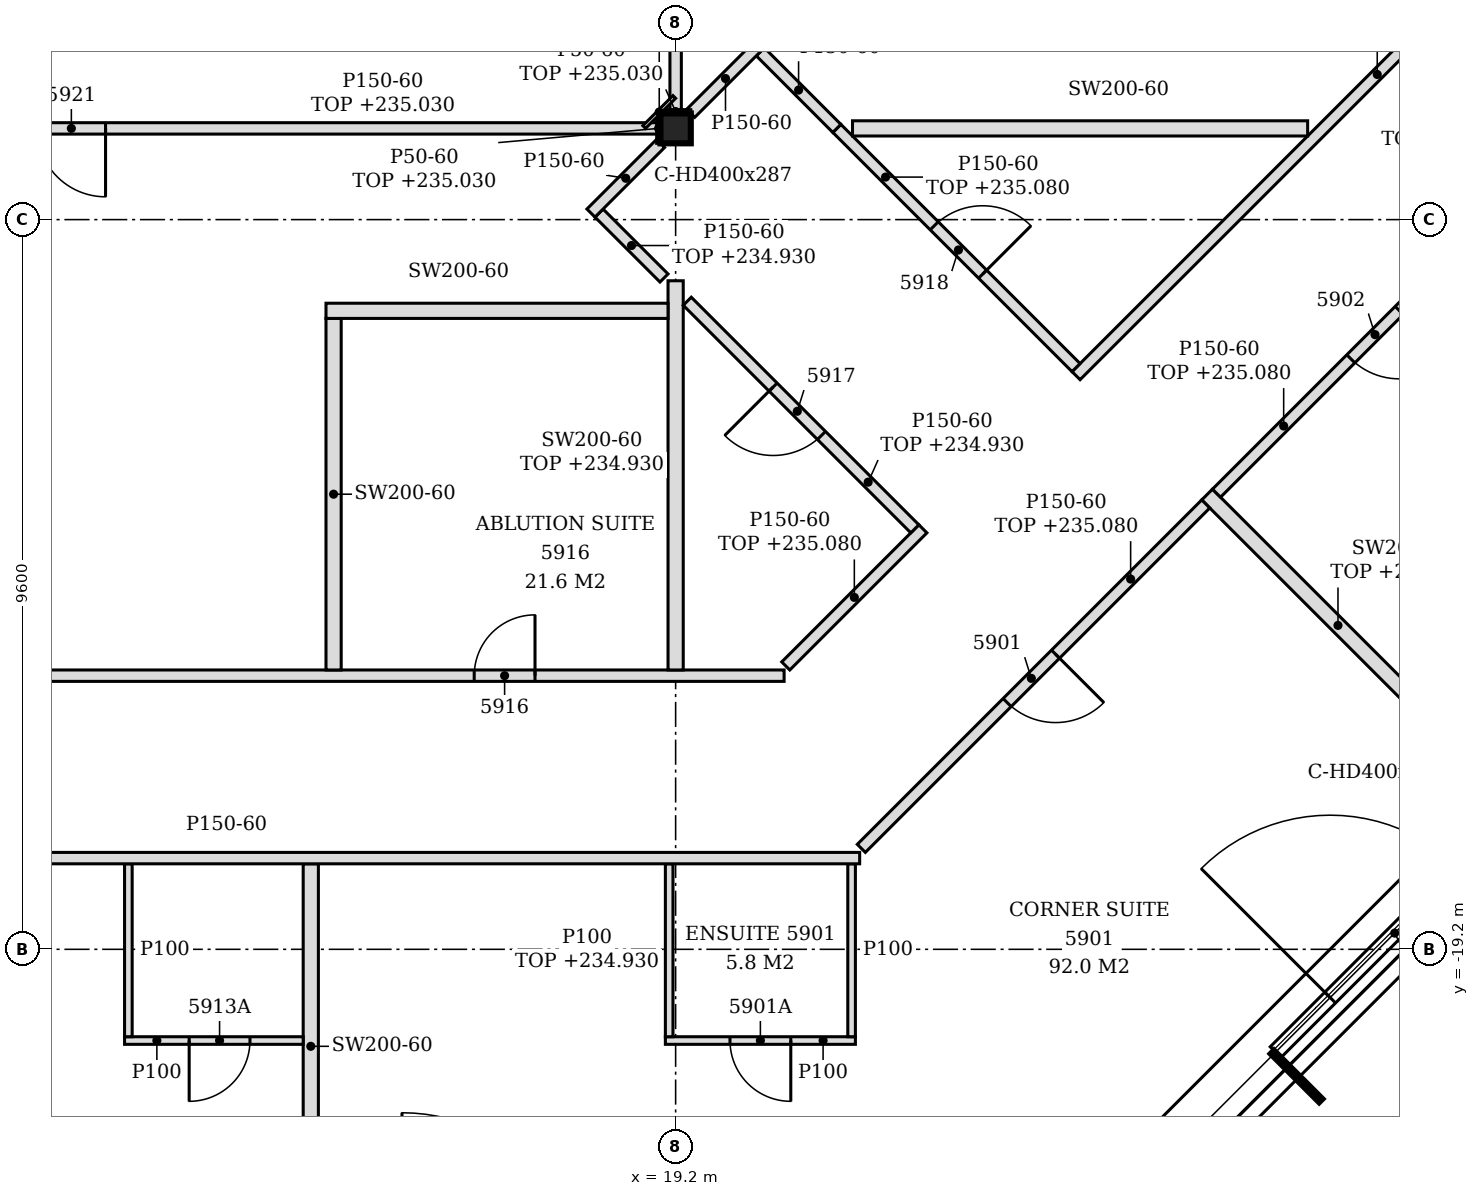
"""IFC4 building model, lengths in metres.
Left out: names, types, materials, properties, quantities, classifications, styles, units other than length and angle.
Written with IfcOpenShell. Run it as: python <this file> out.ifc"""

import sys

from ifc_helpers import new_model, si_unit, direction, frame, frame_2d, origin, origin_2d, place, context, subcontext, project, spatial, polyline, rectangle, i_section, outline, extrude, element, fill, save


model = new_model("IFC4")
c1 = context("Model", 3, precision=1e-05, world=origin(), true_north=direction((0.0, 1.0)))
c2 = subcontext(c1, "Body", "Model", "MODEL_VIEW")
j1 = project(units=[si_unit("LENGTHUNIT", "METRE"), si_unit("PLANEANGLEUNIT", "RADIAN")], contexts=[c1])
p1 = place(None, origin())
s1 = spatial("IfcSite", under=j1, at=p1, CompositionType="ELEMENT")
p2 = place(p1, origin())
s2 = spatial("IfcBuilding", under=s1, at=p2, CompositionType="ELEMENT")
p3 = place(p2, frame((0.0, 0.0, 232.2)))
s3 = spatial("IfcBuildingStorey", under=s2, at=p3, CompositionType="ELEMENT", Elevation=232.2)
p4 = place(p3, frame((19.2, -8.4, -0.15), z_axis=(0.0, 0.0, 1.0), x_axis=(1.0, 0.0, 0.0)))
e1 = element("IfcColumn", 1, at=p4, inside=s3, PredefinedType="COLUMN", context=c2, shape_type="SweptSolid", body=[
    extrude(i_section(OverallWidth=0.399, OverallDepth=0.393, WebThickness=0.023, FlangeThickness=0.037, FilletRadius=0.015, at=origin_2d()), origin(), (0.0, 0.0, 1.0), 3.6),
])
p5 = place(p3, frame((27.093, -20.553, 0.0), z_axis=(0.0, 0.0, 1.0), x_axis=(0.707079231393, 0.707134329907, 0.0)))
e2 = element("IfcWall", 2, at=p5, inside=s3, PredefinedType="NOTDEFINED", context=c2, shape_type="SweptSolid", body=[
    extrude(rectangle(XDim=4.431, YDim=0.2, at=frame_2d((2.215, 0.0))), origin(), (0.0, 0.0, 1.0), 3.45),
])
p6 = place(p5, frame((1.015, 0.0, 0.0)))
e3 = element("IfcOpeningElement", 3, at=p6, cuts=e2, PredefinedType="OPENING", context=c2, shape_type="SweptSolid", body=[
    extrude(rectangle(XDim=2.4, YDim=2.4, at=frame_2d((1.2, 1.2))), frame((0.0, 0.11, 0.0), z_axis=(0.0, -1.0, 0.0), x_axis=(1.0, 0.0, 0.0)), (0.0, 0.0, 1.0), 0.22),
])
p7 = place(p3, frame((14.4, -22.877, 0.0), z_axis=(0.0, 0.0, 1.0), x_axis=(0.0, 1.0, 0.0)))
e4 = element("IfcWall", 4, at=p7, inside=s3, PredefinedType="PARTITIONING", context=c2, shape_type="SweptSolid", body=[
    extrude(outline(polyline([(0.0, 0.0), (4.802, 0.0), (4.802, 3.45), (3.782, 3.45), (3.78, 2.88), (3.572, 2.88), (3.57, 3.45), (0.0, 3.45), (0.0, 0.0)])), frame((0.0, 0.1, 0.0), z_axis=(0.0, -1.0, 0.0), x_axis=(1.0, 0.0, 0.0)), (0.0, 0.0, 1.0), 0.2),
])
p8 = place(p3, frame((11.95, -20.4, 0.0), z_axis=(0.0, 0.0, 1.0), x_axis=(1.0, 0.0, 0.0)))
e5 = element("IfcWall", 5, at=p8, inside=s3, PredefinedType="PARTITIONING", context=c2, shape_type="SweptSolid", body=[
    extrude(rectangle(XDim=2.35, YDim=0.1, at=frame_2d((1.175, 0.0))), origin(), (0.0, 0.0, 1.0), 3.45),
])
p9 = place(p8, frame((0.85, 0.0, 0.0)))
e6 = element("IfcOpeningElement", 6, at=p9, cuts=e5, PredefinedType="OPENING", context=c2, shape_type="SweptSolid", body=[
    extrude(rectangle(XDim=0.8, YDim=2.1, at=frame_2d((0.4, 1.05))), frame((0.0, 0.06, 0.0), z_axis=(0.0, -1.0, 0.0), x_axis=(1.0, 0.0, 0.0)), (0.0, 0.0, 1.0), 0.12),
])
p10 = place(p3, frame((12.0, -20.35, 0.0), z_axis=(0.0, 0.0, 1.0), x_axis=(0.0, 1.0, 0.0)))
e7 = element("IfcWall", 7, at=p10, inside=s3, PredefinedType="PARTITIONING", context=c2, shape_type="SweptSolid", body=[
    extrude(outline(polyline([(0.0, 0.0), (2.275, 0.0), (2.275, 3.45), (1.255, 3.45), (1.253, 2.88), (1.045, 2.88), (1.043, 3.45), (0.0, 3.45), (0.0, 0.0)])), frame((0.0, 0.05, 0.0), z_axis=(0.0, -1.0, 0.0), x_axis=(1.0, 0.0, 0.0)), (0.0, 0.0, 1.0), 0.1),
])
p11 = place(p3, frame((19.065, -20.4, 0.0), z_axis=(0.0, 0.0, 1.0), x_axis=(1.0, 0.0, 0.0)))
e8 = element("IfcWall", 8, at=p11, inside=s3, PredefinedType="PARTITIONING", context=c2, shape_type="SweptSolid", body=[
    extrude(outline(polyline([(0.0, 0.0), (2.5, 0.0), (2.5, 3.45), (0.285, 3.45), (0.283, 2.73), (0.0, 2.73), (0.0, 0.0)])), frame((0.0, 0.05, 0.0), z_axis=(0.0, -1.0, 0.0), x_axis=(1.0, 0.0, 0.0)), (0.0, 0.0, 1.0), 0.1),
])
p12 = place(p11, frame((0.85, 0.0, 0.0)))
e9 = element("IfcOpeningElement", 9, at=p12, cuts=e8, PredefinedType="OPENING", context=c2, shape_type="SweptSolid", body=[
    extrude(rectangle(XDim=0.8, YDim=2.1, at=frame_2d((0.4, 1.05))), frame((0.0, 0.06, 0.0), z_axis=(0.0, -1.0, 0.0), x_axis=(1.0, 0.0, 0.0)), (0.0, 0.0, 1.0), 0.12),
])
p13 = place(p3, frame((19.115, -20.35, 0.0), z_axis=(0.0, 0.0, 1.0), x_axis=(0.0, 1.0, 0.0)))
e10 = element("IfcWall", 10, at=p13, inside=s3, PredefinedType="PARTITIONING", context=c2, shape_type="SweptSolid", body=[
    extrude(rectangle(XDim=2.275, YDim=0.1, at=frame_2d((1.138, 0.0))), origin(), (0.0, 0.0, 1.0), 2.73),
])
p14 = place(p3, frame((21.515, -20.35, 0.0), z_axis=(0.0, 0.0, 1.0), x_axis=(0.0, 1.0, 0.0)))
e11 = element("IfcWall", 11, at=p14, inside=s3, PredefinedType="PARTITIONING", context=c2, shape_type="SweptSolid", body=[
    extrude(outline(polyline([(0.0, 0.0), (2.275, 0.0), (2.275, 3.45), (1.245, 3.45), (1.243, 2.98), (1.055, 2.98), (1.053, 3.45), (0.0, 3.45), (0.0, 0.0)])), frame((0.0, 0.05, 0.0), z_axis=(0.0, -1.0, 0.0), x_axis=(1.0, 0.0, 0.0)), (0.0, 0.0, 1.0), 0.1),
])
p15 = place(p3, frame((-0.726, -18.0, 0.0), z_axis=(0.0, 0.0, 1.0), x_axis=(1.0, 0.0, 0.0)))
e12 = element("IfcWall", 12, at=p15, inside=s3, PredefinedType="PARTITIONING", context=c2, shape_type="SweptSolid", body=[
    extrude(outline(polyline([(0.0, 0.0), (22.347, 0.0), (22.347, 3.45), (20.076, 3.45), (20.074, 2.73), (19.776, 2.73), (19.774, 3.45), (8.076, 3.45), (8.074, 2.73), (7.776, 2.73), (7.774, 3.45), (1.086, 3.45), (1.084, 2.93), (0.512, 2.93), (0.51, 3.45), (0.0, 3.45), (0.0, 0.0)])), frame((0.0, 0.075, 0.0), z_axis=(0.0, -1.0, 0.0), x_axis=(1.0, 0.0, 0.0)), (0.0, 0.0, 1.0), 0.15),
])
p16 = place(p15, frame((5.676, 0.0, 0.0)))
e13 = element("IfcOpeningElement", 13, at=p16, cuts=e12, PredefinedType="OPENING", context=c2, shape_type="SweptSolid", body=[
    extrude(rectangle(XDim=0.9, YDim=2.1, at=frame_2d((0.45, 1.05))), frame((0.0, 0.085, 0.0), z_axis=(0.0, -1.0, 0.0), x_axis=(1.0, 0.0, 0.0)), (0.0, 0.0, 1.0), 0.17),
])
p17 = place(p3, frame((21.643, -17.872, 0.0), z_axis=(0.0, 0.0, 1.0), x_axis=(0.707106781187, 0.707106781187, 0.0)))
e14 = element("IfcWall", 14, at=p17, inside=s3, PredefinedType="PARTITIONING", context=c2, shape_type="SweptSolid", body=[
    extrude(rectangle(XDim=6.408, YDim=0.15, at=frame_2d((3.204, 0.0))), origin(), (0.0, 0.0, 1.0), 2.88),
])
p18 = place(p17, frame((2.713, 0.0, 0.0)))
e15 = element("IfcOpeningElement", 15, at=p18, cuts=e14, PredefinedType="OPENING", context=c2, shape_type="SweptSolid", body=[
    extrude(rectangle(XDim=0.9, YDim=2.1, at=frame_2d((0.45, 1.05))), frame((0.0, 0.085, 0.0), z_axis=(0.0, -1.0, 0.0), x_axis=(1.0, 0.0, 0.0)), (0.0, 0.0, 1.0), 0.17),
])
p19 = place(p3, frame((29.636, -16.66, 0.0), z_axis=(0.0, 0.0, 1.0), x_axis=(-0.707207037357, 0.707006510799, 0.0)))
e16 = element("IfcWall", 16, at=p19, inside=s3, PredefinedType="PARTITIONING", context=c2, shape_type="SweptSolid", body=[
    extrude(rectangle(XDim=4.87, YDim=0.2, at=frame_2d((2.435, 0.0))), origin(), (0.0, 0.0, 1.0), 2.88),
])
p20 = place(p3, frame((-0.312, -15.6, 0.0), z_axis=(0.0, 0.0, 1.0), x_axis=(1.0, 0.0, 0.0)))
e17 = element("IfcWall", 17, at=p20, inside=s3, PredefinedType="PARTITIONING", context=c2, shape_type="SweptSolid", body=[
    extrude(outline(polyline([(0.0, 0.0), (20.939, 0.0), (20.939, 3.45), (19.662, 3.45), (19.66, 2.73), (19.362, 2.73), (19.36, 3.45), (7.662, 3.45), (7.66, 2.73), (7.362, 2.73), (7.36, 3.45), (0.0, 3.45), (0.0, 0.0)])), frame((0.0, 0.075, 0.0), z_axis=(0.0, -1.0, 0.0), x_axis=(1.0, 0.0, 0.0)), (0.0, 0.0, 1.0), 0.15),
])
p21 = place(p20, frame((16.862, 0.0, 0.0)))
e18 = element("IfcOpeningElement", 18, at=p21, cuts=e17, PredefinedType="OPENING", context=c2, shape_type="SweptSolid", body=[
    extrude(rectangle(XDim=0.8, YDim=2.1, at=frame_2d((0.4, 1.05))), frame((0.0, 0.085, 0.0), z_axis=(0.0, -1.0, 0.0), x_axis=(1.0, 0.0, 0.0)), (0.0, 0.0, 1.0), 0.17),
])
p22 = place(p3, frame((14.7, -15.525, 0.0), z_axis=(0.0, 0.0, 1.0), x_axis=(0.0, 1.0, 0.0)))
e19 = element("IfcWall", 19, at=p22, inside=s3, PredefinedType="PARTITIONING", context=c2, shape_type="SweptSolid", body=[
    extrude(outline(polyline([(0.0, 0.0), (4.625, 0.0), (4.625, 3.45), (1.23, 3.45), (1.228, 2.88), (1.02, 2.88), (1.018, 3.45), (0.0, 3.45), (0.0, 0.0)])), frame((0.0, 0.1, 0.0), z_axis=(0.0, -1.0, 0.0), x_axis=(1.0, 0.0, 0.0)), (0.0, 0.0, 1.0), 0.2),
])
p23 = place(p3, frame((19.2, -15.525, 0.0), z_axis=(0.0, 0.0, 1.0), x_axis=(0.0, 1.0, 0.0)))
e20 = element("IfcWall", 20, at=p23, inside=s3, PredefinedType="PARTITIONING", context=c2, shape_type="SweptSolid", body=[
    extrude(rectangle(XDim=5.12, YDim=0.2, at=frame_2d((2.56, 0.0))), origin(), (0.0, 0.0, 1.0), 2.73),
])
p24 = place(p3, frame((20.649, -15.472, 0.0), z_axis=(0.0, 0.0, 1.0), x_axis=(0.707106781187, 0.707106781187, 0.0)))
e21 = element("IfcWall", 21, at=p24, inside=s3, PredefinedType="PARTITIONING", context=c2, shape_type="SweptSolid", body=[
    extrude(rectangle(XDim=2.551, YDim=0.15, at=frame_2d((1.276, 0.0))), origin(), (0.0, 0.0, 1.0), 2.88),
])
p25 = place(p3, frame((22.347, -13.668, 0.0), z_axis=(0.0, 0.0, 1.0), x_axis=(-0.707106781187, 0.707106781187, 0.0)))
e22 = element("IfcWall", 22, at=p25, inside=s3, PredefinedType="PARTITIONING", context=c2, shape_type="SweptSolid", body=[
    extrude(rectangle(XDim=4.234, YDim=0.15, at=frame_2d((2.117, 0.0))), origin(), (0.0, 0.0, 1.0), 2.73),
])
p26 = place(p25, frame((1.737, 0.0, 0.0)))
e23 = element("IfcOpeningElement", 23, at=p26, cuts=e22, PredefinedType="OPENING", context=c2, shape_type="SweptSolid", body=[
    extrude(rectangle(XDim=0.9, YDim=2.1, at=frame_2d((0.45, 1.05))), frame((0.0, 0.085, 0.0), z_axis=(0.0, -1.0, 0.0), x_axis=(1.0, 0.0, 0.0)), (0.0, 0.0, 1.0), 0.17),
])
p27 = place(p3, frame((26.316, -13.199, 0.0), z_axis=(0.0, 0.0, 1.0), x_axis=(0.707024001185, 0.707189551498, 0.0)))
e24 = element("IfcWall", 24, at=p27, inside=s3, PredefinedType="PARTITIONING", context=c2, shape_type="SweptSolid", body=[
    extrude(rectangle(XDim=5.899, YDim=0.15, at=frame_2d((2.949, 0.0))), origin(), (0.0, 0.0, 1.0), 2.88),
])
p28 = place(p27, frame((2.5, 0.0, 0.0)))
e25 = element("IfcOpeningElement", 25, at=p28, cuts=e24, PredefinedType="OPENING", context=c2, shape_type="SweptSolid", body=[
    extrude(rectangle(XDim=0.9, YDim=2.1, at=frame_2d((0.45, 1.05))), frame((0.0, 0.085, 0.0), z_axis=(0.0, -1.0, 0.0), x_axis=(1.0, 0.0, 0.0)), (0.0, 0.0, 1.0), 0.17),
])
p29 = place(p3, frame((24.468, -11.653, 0.0), z_axis=(0.0, 0.0, 1.0), x_axis=(0.707095889299, 0.707117672906, 0.0)))
e26 = element("IfcWall", 26, at=p29, inside=s3, PredefinedType="PARTITIONING", context=c2, shape_type="SweptSolid", body=[
    extrude(rectangle(XDim=11.208, YDim=0.15, at=frame_2d((5.604, 0.0))), origin(), (0.0, 0.0, 1.0), 2.88),
])
p30 = place(p3, frame((24.468, -11.547, 0.0), z_axis=(0.0, 0.0, 1.0), x_axis=(-0.707079353217, 0.707134208093, 0.0)))
e27 = element("IfcWall", 27, at=p30, inside=s3, PredefinedType="PARTITIONING", context=c2, shape_type="SweptSolid", body=[
    extrude(rectangle(XDim=4.451, YDim=0.15, at=frame_2d((2.225, 0.0))), origin(), (0.0, 0.0, 1.0), 2.88),
])
p31 = place(p30, frame((1.739, 0.0, 0.0)))
e28 = element("IfcOpeningElement", 28, at=p31, cuts=e27, PredefinedType="OPENING", context=c2, shape_type="SweptSolid", body=[
    extrude(rectangle(XDim=0.9, YDim=2.1, at=frame_2d((0.45, 1.05))), frame((0.0, 0.085, 0.0), z_axis=(0.0, -1.0, 0.0), x_axis=(1.0, 0.0, 0.0)), (0.0, 0.0, 1.0), 0.17),
])
p32 = place(p3, frame((14.6, -10.8, 0.0), z_axis=(0.0, 0.0, 1.0), x_axis=(1.0, 0.0, 0.0)))
e29 = element("IfcWall", 29, at=p32, inside=s3, PredefinedType="PARTITIONING", context=c2, shape_type="SweptSolid", body=[
    extrude(outline(polyline([(0.0, 0.0), (4.5, 0.0), (4.5, 2.73), (4.45, 2.73), (4.448, 3.45), (0.0, 3.45), (0.0, 0.0)])), frame((0.0, 0.1, 0.0), z_axis=(0.0, -1.0, 0.0), x_axis=(1.0, 0.0, 0.0)), (0.0, 0.0, 1.0), 0.2),
])
p33 = place(p3, frame((19.047, -10.368, 0.0), z_axis=(0.0, 0.0, 1.0), x_axis=(-0.707409718716, 0.706803713817, 0.0)))
e30 = element("IfcWall", 30, at=p33, inside=s3, PredefinedType="PARTITIONING", context=c2, shape_type="SweptSolid", body=[
    extrude(rectangle(XDim=1.208, YDim=0.15, at=frame_2d((0.604, 0.0))), origin(), (0.0, 0.0, 1.0), 2.73),
])
p34 = place(p3, frame((18.086, -9.514, 0.0), z_axis=(0.0, 0.0, 1.0), x_axis=(0.707106781187, 0.707106781187, 0.0)))
e31 = element("IfcWall", 31, at=p34, inside=s3, PredefinedType="PARTITIONING", context=c2, shape_type="SweptSolid", body=[
    extrude(rectangle(XDim=1.295, YDim=0.15, at=frame_2d((0.648, 0.0))), origin(), (0.0, 0.0, 1.0), 3.45),
])
p35 = place(p3, frame((7.399, -8.4, 0.0), z_axis=(0.0, 0.0, 1.0), x_axis=(1.0, 0.0, 0.0)))
e32 = element("IfcWall", 32, at=p35, inside=s3, PredefinedType="PARTITIONING", context=c2, shape_type="SweptSolid", body=[
    extrude(rectangle(XDim=11.601, YDim=0.15, at=frame_2d((5.801, 0.0))), origin(), (0.0, 0.0, 1.0), 2.83),
])
p36 = place(p35, frame((3.4, 0.0, 0.0)))
e33 = element("IfcOpeningElement", 33, at=p36, cuts=e32, PredefinedType="OPENING", context=c2, shape_type="SweptSolid", body=[
    extrude(rectangle(XDim=0.9, YDim=2.1, at=frame_2d((0.45, 1.05))), frame((0.0, 0.085, 0.0), z_axis=(0.0, -1.0, 0.0), x_axis=(1.0, 0.0, 0.0)), (0.0, 0.0, 1.0), 0.17),
])
p37 = place(p3, frame((21.321, -8.4, 0.0), z_axis=(0.0, 0.0, 1.0), x_axis=(-0.706763941595, 0.707449454633, 0.0)))
e34 = element("IfcWall", 34, at=p37, inside=s3, PredefinedType="PARTITIONING", context=c2, shape_type="SweptSolid", body=[
    extrude(rectangle(XDim=1.425, YDim=0.15, at=frame_2d((0.712, 0.0))), origin(), (0.0, 0.0, 1.0), 3.45),
])
p38 = place(p3, frame((21.527, -8.4, 0.0), z_axis=(0.0, 0.0, 1.0), x_axis=(1.0, 0.0, 0.0)))
e35 = element("IfcWall", 35, at=p38, inside=s3, PredefinedType="PARTITIONING", context=c2, shape_type="SweptSolid", body=[
    extrude(rectangle(XDim=5.988, YDim=0.2, at=frame_2d((2.994, 0.0))), origin(), (0.0, 0.0, 1.0), 3.45),
])
p39 = place(p3, frame((19.2, -8.204, 0.0), z_axis=(0.0, 0.0, 1.0), x_axis=(0.0, 1.0, 0.0)))
e36 = element("IfcWall", 36, at=p39, inside=s3, PredefinedType="PARTITIONING", context=c2, shape_type="SweptSolid", body=[
    extrude(rectangle(XDim=4.529, YDim=0.15, at=frame_2d((2.264, 0.0))), origin(), (0.0, 0.0, 1.0), 2.83),
])
p40 = place(p3, frame((19.398, -8.202, 0.0), z_axis=(0.0, 0.0, 1.0), x_axis=(0.707200993001, 0.707012556818, 0.0)))
e37 = element("IfcWall", 37, at=p40, inside=s3, PredefinedType="PARTITIONING", context=c2, shape_type="SweptSolid", body=[
    extrude(rectangle(XDim=1.296, YDim=0.15, at=frame_2d((0.648, 0.0))), origin(), (0.0, 0.0, 1.0), 3.45),
])
p41 = place(p3, frame((18.786, -8.382, 0.0), z_axis=(0.0, 0.0, 1.0), x_axis=(0.707106781187, 0.707106781187, 0.0)))
e38 = element("IfcWall", 38, at=p41, inside=s3, PredefinedType="PARTITIONING", context=c2, shape_type="SweptSolid", body=[
    extrude(rectangle(XDim=0.56, YDim=0.05, at=frame_2d((0.28, 0.0))), origin(), (0.0, 0.0, 1.0), 2.83),
])
p42 = place(p3, frame((19.0, -8.178, 0.0), z_axis=(0.0, 0.0, 1.0), x_axis=(1.0, 0.0, 0.0)))
e39 = element("IfcWall", 39, at=p42, inside=s3, PredefinedType="PARTITIONING", context=c2, shape_type="SweptSolid", body=[
    extrude(rectangle(XDim=0.399, YDim=0.05, at=frame_2d((0.199, 0.0))), origin(), (0.0, 0.0, 1.0), 2.83),
])
p43 = place(p3, frame((18.976, -8.596, 0.0), z_axis=(0.0, 0.0, 1.0), x_axis=(0.0, 1.0, 0.0)))
e40 = element("IfcWall", 40, at=p43, inside=s3, PredefinedType="PARTITIONING", context=c2, shape_type="SweptSolid", body=[
    extrude(rectangle(XDim=0.393, YDim=0.05, at=frame_2d((0.196, 0.0))), origin(), (0.0, 0.0, 1.0), 2.83),
])
p44 = place(p6, origin())
e41 = element("IfcDoor", 41, at=p44, inside=s3, OperationType="SINGLE_SWING_LEFT", PredefinedType="DOOR", context=c2, shape_type="SweptSolid", body=[
    extrude(rectangle(XDim=2.4, YDim=2.4, at=frame_2d((1.2, 1.2))), frame((0.0, 0.025, 0.0), z_axis=(0.0, -1.0, 0.0), x_axis=(1.0, 0.0, 0.0)), (0.0, 0.0, 1.0), 0.05),
])
fill(e3, e41)
p45 = place(p18, frame((0.9, 0.0, 0.0), z_axis=(0.0, 0.0, 1.0), x_axis=(-1.0, 0.0, 0.0)))
e42 = element("IfcDoor", 42, at=p45, inside=s3, OperationType="SINGLE_SWING_LEFT", PredefinedType="DOOR", context=c2, shape_type="SweptSolid", body=[
    extrude(rectangle(XDim=0.9, YDim=2.1, at=frame_2d((0.45, 1.05))), frame((0.0, 0.025, 0.0), z_axis=(0.0, -1.0, 0.0), x_axis=(1.0, 0.0, 0.0)), (0.0, 0.0, 1.0), 0.05),
])
fill(e15, e42)
p46 = place(p12, frame((0.8, 0.0, 0.0), z_axis=(0.0, 0.0, 1.0), x_axis=(-1.0, 0.0, 0.0)))
e43 = element("IfcDoor", 43, at=p46, inside=s3, OperationType="SINGLE_SWING_LEFT", PredefinedType="DOOR", context=c2, shape_type="SweptSolid", body=[
    extrude(rectangle(XDim=0.8, YDim=2.1, at=frame_2d((0.4, 1.05))), frame((0.0, 0.025, 0.0), z_axis=(0.0, -1.0, 0.0), x_axis=(1.0, 0.0, 0.0)), (0.0, 0.0, 1.0), 0.05),
])
fill(e9, e43)
p47 = place(p28, frame((0.9, 0.0, 0.0), z_axis=(0.0, 0.0, 1.0), x_axis=(-1.0, 0.0, 0.0)))
e44 = element("IfcDoor", 44, at=p47, inside=s3, OperationType="SINGLE_SWING_LEFT", PredefinedType="DOOR", context=c2, shape_type="SweptSolid", body=[
    extrude(rectangle(XDim=0.9, YDim=2.1, at=frame_2d((0.45, 1.05))), frame((0.0, 0.025, 0.0), z_axis=(0.0, -1.0, 0.0), x_axis=(1.0, 0.0, 0.0)), (0.0, 0.0, 1.0), 0.05),
])
fill(e25, e44)
p48 = place(p9, frame((0.8, 0.0, 0.0), z_axis=(0.0, 0.0, 1.0), x_axis=(-1.0, 0.0, 0.0)))
e45 = element("IfcDoor", 45, at=p48, inside=s3, OperationType="SINGLE_SWING_RIGHT", PredefinedType="DOOR", context=c2, shape_type="SweptSolid", body=[
    extrude(rectangle(XDim=0.8, YDim=2.1, at=frame_2d((0.4, 1.05))), frame((0.0, 0.025, 0.0), z_axis=(0.0, -1.0, 0.0), x_axis=(1.0, 0.0, 0.0)), (0.0, 0.0, 1.0), 0.05),
])
fill(e6, e45)
p49 = place(p21, origin())
e46 = element("IfcDoor", 46, at=p49, inside=s3, OperationType="SINGLE_SWING_RIGHT", PredefinedType="DOOR", context=c2, shape_type="SweptSolid", body=[
    extrude(rectangle(XDim=0.8, YDim=2.1, at=frame_2d((0.4, 1.05))), frame((0.0, 0.025, 0.0), z_axis=(0.0, -1.0, 0.0), x_axis=(1.0, 0.0, 0.0)), (0.0, 0.0, 1.0), 0.05),
])
fill(e18, e46)
p50 = place(p26, origin())
e47 = element("IfcDoor", 47, at=p50, inside=s3, OperationType="SINGLE_SWING_RIGHT", PredefinedType="DOOR", context=c2, shape_type="SweptSolid", body=[
    extrude(rectangle(XDim=0.9, YDim=2.1, at=frame_2d((0.45, 1.05))), frame((0.0, 0.025, 0.0), z_axis=(0.0, -1.0, 0.0), x_axis=(1.0, 0.0, 0.0)), (0.0, 0.0, 1.0), 0.05),
])
fill(e23, e47)
p51 = place(p31, frame((0.9, 0.0, 0.0), z_axis=(0.0, 0.0, 1.0), x_axis=(-1.0, 0.0, 0.0)))
e48 = element("IfcDoor", 48, at=p51, inside=s3, OperationType="SINGLE_SWING_RIGHT", PredefinedType="DOOR", context=c2, shape_type="SweptSolid", body=[
    extrude(rectangle(XDim=0.9, YDim=2.1, at=frame_2d((0.45, 1.05))), frame((0.0, 0.025, 0.0), z_axis=(0.0, -1.0, 0.0), x_axis=(1.0, 0.0, 0.0)), (0.0, 0.0, 1.0), 0.05),
])
fill(e28, e48)
p52 = place(p36, frame((0.9, 0.0, 0.0), z_axis=(0.0, 0.0, 1.0), x_axis=(-1.0, 0.0, 0.0)))
e49 = element("IfcDoor", 49, at=p52, inside=s3, OperationType="SINGLE_SWING_LEFT", PredefinedType="DOOR", context=c2, shape_type="SweptSolid", body=[
    extrude(rectangle(XDim=0.9, YDim=2.1, at=frame_2d((0.45, 1.05))), frame((0.0, 0.025, 0.0), z_axis=(0.0, -1.0, 0.0), x_axis=(1.0, 0.0, 0.0)), (0.0, 0.0, 1.0), 0.05),
])
fill(e33, e49)
save(model, sys.argv[1])
